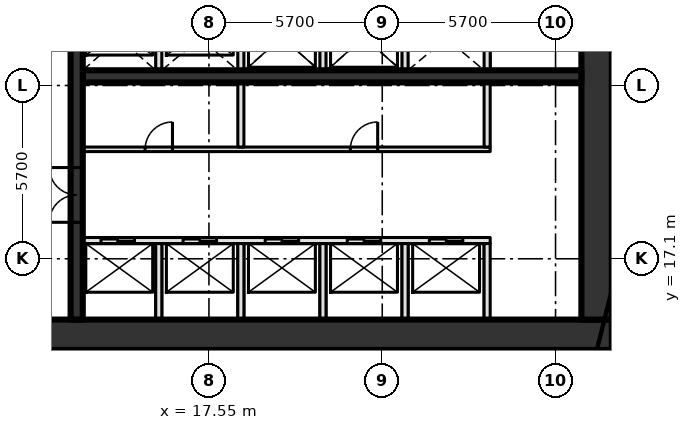
"""IFC4 building model, lengths in metres.
Left out: names, types, materials, properties, quantities, classifications, styles, units other than length and angle.
Written with IfcOpenShell. Run it as: python <this file> out.ifc"""

import sys

from ifc_helpers import new_model, si_unit, direction, frame, frame_2d, origin, place, context, subcontext, project, spatial, rectangle, extrude, element, fill, save


model = new_model("IFC4")
c1 = context("Model", 3, precision=1e-05, world=origin(), true_north=direction((0.0, 1.0)))
c2 = subcontext(c1, "Body", "Model", "MODEL_VIEW")
j1 = project(units=[si_unit("LENGTHUNIT", "METRE"), si_unit("PLANEANGLEUNIT", "RADIAN")], contexts=[c1])
p1 = place(None, origin())
s1 = spatial("IfcSite", under=j1, at=p1, CompositionType="ELEMENT")
p2 = place(p1, origin())
s2 = spatial("IfcBuilding", under=s1, at=p2, CompositionType="ELEMENT")
p3 = place(p2, frame((0.0, 0.0, 33.0)))
s3 = spatial("IfcBuildingStorey", under=s2, at=p3, CompositionType="ELEMENT", Elevation=33.0)
p4 = place(p3, frame((8.0, 14.6, -0.45), z_axis=(0.0, 0.0, 1.0), x_axis=(1.0, 0.0, 0.0)))
e1 = element("IfcWall", 1, at=p4, inside=s3, PredefinedType="SHEAR", context=c2, shape_type="SweptSolid", body=[
    extrude(rectangle(XDim=22.8, YDim=1.0, at=frame_2d((11.4, 0.0))), origin(), (0.0, 0.0, 1.0), 4.35),
])
p5 = place(p4, frame((2.3, 0.0, 0.45)))
e2 = element("IfcOpeningElement", 2, at=p5, cuts=e1, PredefinedType="OPENING", context=c2, shape_type="SweptSolid", body=[
    extrude(rectangle(XDim=1.8, YDim=2.1, at=frame_2d((0.9, 1.05))), frame((0.0, 0.51, 0.0), z_axis=(0.0, -1.0, 0.0), x_axis=(1.0, 0.0, 0.0)), (0.0, 0.0, 1.0), 1.02),
])
p6 = place(p3, frame((30.3, 15.1, -0.45), z_axis=(0.0, 0.0, 1.0), x_axis=(0.0, 1.0, 0.0)))
e3 = element("IfcWall", 3, at=p6, inside=s3, PredefinedType="SHEAR", context=c2, shape_type="SweptSolid", body=[
    extrude(rectangle(XDim=20.6, YDim=1.0, at=frame_2d((10.3, 0.0))), origin(), (0.0, 0.0, 1.0), 4.35),
])
p7 = place(p3, frame((13.4, 17.7, 0.0), z_axis=(0.0, 0.0, 1.0), x_axis=(1.0, 0.0, 0.0)))
e4 = element("IfcWall", 4, at=p7, inside=s3, PredefinedType="SOLIDWALL", context=c2, shape_type="SweptSolid", body=[
    extrude(rectangle(XDim=13.4, YDim=0.2, at=frame_2d((6.7, 0.0))), origin(), (0.0, 0.0, 1.0), 3.9),
])
p8 = place(p7, frame((0.6, 0.0, 0.0)))
e5 = element("IfcOpeningElement", 5, at=p8, cuts=e4, PredefinedType="OPENING", context=c2, shape_type="SweptSolid", body=[
    extrude(rectangle(XDim=1.1, YDim=2.1, at=frame_2d((0.55, 1.05))), frame((0.0, 0.11, 0.0), z_axis=(0.0, -1.0, 0.0), x_axis=(1.0, 0.0, 0.0)), (0.0, 0.0, 1.0), 0.22),
])
p9 = place(p7, frame((3.3, 0.0, 0.0)))
e6 = element("IfcOpeningElement", 6, at=p9, cuts=e4, PredefinedType="OPENING", context=c2, shape_type="SweptSolid", body=[
    extrude(rectangle(XDim=1.1, YDim=2.1, at=frame_2d((0.55, 1.05))), frame((0.0, 0.11, 0.0), z_axis=(0.0, -1.0, 0.0), x_axis=(1.0, 0.0, 0.0)), (0.0, 0.0, 1.0), 0.22),
])
p10 = place(p7, frame((6.0, 0.0, 0.0)))
e7 = element("IfcOpeningElement", 7, at=p10, cuts=e4, PredefinedType="OPENING", context=c2, shape_type="SweptSolid", body=[
    extrude(rectangle(XDim=1.1, YDim=2.1, at=frame_2d((0.55, 1.05))), frame((0.0, 0.11, 0.0), z_axis=(0.0, -1.0, 0.0), x_axis=(1.0, 0.0, 0.0)), (0.0, 0.0, 1.0), 0.22),
])
p11 = place(p7, frame((8.7, 0.0, 0.0)))
e8 = element("IfcOpeningElement", 8, at=p11, cuts=e4, PredefinedType="OPENING", context=c2, shape_type="SweptSolid", body=[
    extrude(rectangle(XDim=1.1, YDim=2.1, at=frame_2d((0.55, 1.05))), frame((0.0, 0.11, 0.0), z_axis=(0.0, -1.0, 0.0), x_axis=(1.0, 0.0, 0.0)), (0.0, 0.0, 1.0), 0.22),
])
p12 = place(p7, frame((11.4, 0.0, 0.0)))
e9 = element("IfcOpeningElement", 9, at=p12, cuts=e4, PredefinedType="OPENING", context=c2, shape_type="SweptSolid", body=[
    extrude(rectangle(XDim=1.1, YDim=2.1, at=frame_2d((0.55, 1.05))), frame((0.0, 0.11, 0.0), z_axis=(0.0, -1.0, 0.0), x_axis=(1.0, 0.0, 0.0)), (0.0, 0.0, 1.0), 0.22),
])
p13 = place(p3, frame((13.4, 20.7, 0.0), z_axis=(0.0, 0.0, 1.0), x_axis=(1.0, 0.0, 0.0)))
e10 = element("IfcWall", 10, at=p13, inside=s3, PredefinedType="PARTITIONING", context=c2, shape_type="SweptSolid", body=[
    extrude(rectangle(XDim=13.4, YDim=0.15, at=frame_2d((6.7, 0.0))), origin(), (0.0, 0.0, 1.0), 3.9),
])
p14 = place(p13, frame((2.05, 0.0, 0.0)))
e11 = element("IfcOpeningElement", 11, at=p14, cuts=e10, PredefinedType="OPENING", context=c2, shape_type="SweptSolid", body=[
    extrude(rectangle(XDim=0.9, YDim=2.1, at=frame_2d((0.45, 1.05))), frame((0.0, 0.085, 0.0), z_axis=(0.0, -1.0, 0.0), x_axis=(1.0, 0.0, 0.0)), (0.0, 0.0, 1.0), 0.17),
])
p15 = place(p13, frame((8.8, 0.0, 0.0)))
e12 = element("IfcOpeningElement", 12, at=p15, cuts=e10, PredefinedType="OPENING", context=c2, shape_type="SweptSolid", body=[
    extrude(rectangle(XDim=0.9, YDim=2.1, at=frame_2d((0.45, 1.05))), frame((0.0, 0.085, 0.0), z_axis=(0.0, -1.0, 0.0), x_axis=(1.0, 0.0, 0.0)), (0.0, 0.0, 1.0), 0.17),
])
p16 = place(p3, frame((13.4, 23.1, 0.0), z_axis=(0.0, 0.0, 1.0), x_axis=(1.0, 0.0, 0.0)))
e13 = element("IfcWall", 13, at=p16, inside=s3, PredefinedType="SHEAR", context=c2, shape_type="SweptSolid", body=[
    extrude(rectangle(XDim=16.4, YDim=0.4, at=frame_2d((8.2, 0.0))), origin(), (0.0, 0.0, 1.0), 3.9),
])
p17 = place(p3, frame((13.2, 15.1, 0.0), z_axis=(0.0, 0.0, 1.0), x_axis=(0.0, 1.0, 0.0)))
e14 = element("IfcWall", 14, at=p17, inside=s3, PredefinedType="SHEAR", context=c2, shape_type="SweptSolid", body=[
    extrude(rectangle(XDim=20.6, YDim=0.4, at=frame_2d((10.3, 0.0))), origin(), (0.0, 0.0, 1.0), 3.9),
])
p18 = place(p17, frame((3.2, 0.0, 0.0)))
e15 = element("IfcOpeningElement", 15, at=p18, cuts=e14, PredefinedType="OPENING", context=c2, shape_type="SweptSolid", body=[
    extrude(rectangle(XDim=1.8, YDim=2.1, at=frame_2d((0.9, 1.05))), frame((0.0, 0.21, 0.0), z_axis=(0.0, -1.0, 0.0), x_axis=(1.0, 0.0, 0.0)), (0.0, 0.0, 1.0), 0.42),
])
p19 = place(p17, frame((11.3, 0.0, 0.0)))
e16 = element("IfcOpeningElement", 16, at=p19, cuts=e14, PredefinedType="OPENING", context=c2, shape_type="SweptSolid", body=[
    extrude(rectangle(XDim=1.2, YDim=2.1, at=frame_2d((0.6, 1.05))), frame((0.0, 0.21, 0.0), z_axis=(0.0, -1.0, 0.0), x_axis=(1.0, 0.0, 0.0)), (0.0, 0.0, 1.0), 0.42),
])
p20 = place(p3, frame((15.9, 15.1, 0.0), z_axis=(0.0, 0.0, 1.0), x_axis=(0.0, 1.0, 0.0)))
e17 = element("IfcWall", 17, at=p20, inside=s3, PredefinedType="SOLIDWALL", context=c2, shape_type="SweptSolid", body=[
    extrude(rectangle(XDim=2.5, YDim=0.2, at=frame_2d((1.25, 0.0))), origin(), (0.0, 0.0, 1.0), 3.9),
])
p21 = place(p3, frame((15.9, 23.3, 0.0), z_axis=(0.0, 0.0, 1.0), x_axis=(0.0, 1.0, 0.0)))
e18 = element("IfcWall", 18, at=p21, inside=s3, PredefinedType="SOLIDWALL", context=c2, shape_type="SweptSolid", body=[
    extrude(rectangle(XDim=2.1, YDim=0.2, at=frame_2d((1.05, 0.0))), origin(), (0.0, 0.0, 1.0), 3.9),
])
p22 = place(p3, frame((18.6, 15.1, 0.0), z_axis=(0.0, 0.0, 1.0), x_axis=(0.0, 1.0, 0.0)))
e19 = element("IfcWall", 19, at=p22, inside=s3, PredefinedType="SOLIDWALL", context=c2, shape_type="SweptSolid", body=[
    extrude(rectangle(XDim=2.5, YDim=0.2, at=frame_2d((1.25, 0.0))), origin(), (0.0, 0.0, 1.0), 3.9),
])
p23 = place(p3, frame((18.6, 20.775, 0.0), z_axis=(0.0, 0.0, 1.0), x_axis=(0.0, 1.0, 0.0)))
e20 = element("IfcWall", 20, at=p23, inside=s3, PredefinedType="SOLIDWALL", context=c2, shape_type="SweptSolid", body=[
    extrude(rectangle(XDim=7.625, YDim=0.2, at=frame_2d((3.812, 0.0))), origin(), (0.0, 0.0, 1.0), 3.9),
])
p24 = place(p23, frame((5.625, 0.0, 0.0)))
e21 = element("IfcOpeningElement", 21, at=p24, cuts=e20, PredefinedType="OPENING", context=c2, shape_type="SweptSolid", body=[
    extrude(rectangle(XDim=1.2, YDim=2.1, at=frame_2d((0.6, 1.05))), frame((0.0, 0.11, 0.0), z_axis=(0.0, -1.0, 0.0), x_axis=(1.0, 0.0, 0.0)), (0.0, 0.0, 1.0), 0.22),
])
p25 = place(p3, frame((21.3, 15.1, 0.0), z_axis=(0.0, 0.0, 1.0), x_axis=(0.0, 1.0, 0.0)))
e22 = element("IfcWall", 22, at=p25, inside=s3, PredefinedType="SOLIDWALL", context=c2, shape_type="SweptSolid", body=[
    extrude(rectangle(XDim=2.5, YDim=0.2, at=frame_2d((1.25, 0.0))), origin(), (0.0, 0.0, 1.0), 3.9),
])
p26 = place(p3, frame((21.3, 23.3, 0.0), z_axis=(0.0, 0.0, 1.0), x_axis=(0.0, 1.0, 0.0)))
e23 = element("IfcWall", 23, at=p26, inside=s3, PredefinedType="SOLIDWALL", context=c2, shape_type="SweptSolid", body=[
    extrude(rectangle(XDim=2.1, YDim=0.2, at=frame_2d((1.05, 0.0))), origin(), (0.0, 0.0, 1.0), 3.9),
])
p27 = place(p3, frame((24.0, 15.1, 0.0), z_axis=(0.0, 0.0, 1.0), x_axis=(0.0, 1.0, 0.0)))
e24 = element("IfcWall", 24, at=p27, inside=s3, PredefinedType="SOLIDWALL", context=c2, shape_type="SweptSolid", body=[
    extrude(rectangle(XDim=2.5, YDim=0.2, at=frame_2d((1.25, 0.0))), origin(), (0.0, 0.0, 1.0), 3.9),
])
p28 = place(p3, frame((24.0, 23.3, 0.0), z_axis=(0.0, 0.0, 1.0), x_axis=(0.0, 1.0, 0.0)))
e25 = element("IfcWall", 25, at=p28, inside=s3, PredefinedType="SOLIDWALL", context=c2, shape_type="SweptSolid", body=[
    extrude(rectangle(XDim=2.1, YDim=0.2, at=frame_2d((1.05, 0.0))), origin(), (0.0, 0.0, 1.0), 3.9),
])
p29 = place(p3, frame((26.7, 15.1, 0.0), z_axis=(0.0, 0.0, 1.0), x_axis=(0.0, 1.0, 0.0)))
e26 = element("IfcWall", 26, at=p29, inside=s3, PredefinedType="SOLIDWALL", context=c2, shape_type="SweptSolid", body=[
    extrude(rectangle(XDim=2.5, YDim=0.2, at=frame_2d((1.25, 0.0))), origin(), (0.0, 0.0, 1.0), 3.9),
])
p30 = place(p3, frame((26.7, 20.775, 0.0), z_axis=(0.0, 0.0, 1.0), x_axis=(0.0, 1.0, 0.0)))
e27 = element("IfcWall", 27, at=p30, inside=s3, PredefinedType="SOLIDWALL", context=c2, shape_type="SweptSolid", body=[
    extrude(rectangle(XDim=4.625, YDim=0.2, at=frame_2d((2.312, 0.0))), origin(), (0.0, 0.0, 1.0), 3.9),
])
p31 = place(p3, frame((12.9, 10.078, 0.0), z_axis=(0.0, 0.0, 1.0), x_axis=(0.0, 1.0, 0.0)))
e28 = element("IfcWall", 28, at=p31, inside=s3, PredefinedType="PARTITIONING", context=c2, shape_type="SweptSolid", body=[
    extrude(rectangle(XDim=4.022, YDim=0.1, at=frame_2d((2.011, 0.0))), origin(), (0.0, 0.0, 1.0), 3.9),
])
p32 = place(p3, frame((30.8, 14.1, 0.0), z_axis=(0.0, 0.0, 1.0), x_axis=(-0.284664373847, -0.95862724469, 0.0)))
e29 = element("IfcWall", 29, at=p32, inside=s3, PredefinedType="PARTITIONING", context=c2, shape_type="SweptSolid", body=[
    extrude(rectangle(XDim=9.018, YDim=0.1, at=frame_2d((4.509, 0.0))), origin(), (0.0, 0.0, 1.0), 3.9),
])
p33 = place(p32, frame((3.88, 0.0, 0.0)))
e30 = element("IfcOpeningElement", 30, at=p33, cuts=e29, PredefinedType="OPENING", context=c2, shape_type="SweptSolid", body=[
    extrude(rectangle(XDim=1.0, YDim=2.1, at=frame_2d((0.5, 1.05))), frame((0.0, 0.06, 0.0), z_axis=(0.0, -1.0, 0.0), x_axis=(1.0, 0.0, 0.0)), (0.0, 0.0, 1.0), 0.12),
])
p34 = place(p3, frame((18.599, 7.915, 0.0), z_axis=(0.0, 0.0, 1.0), x_axis=(0.374461839275, 0.927242325892, 0.0)))
e31 = element("IfcWall", 31, at=p34, inside=s3, PredefinedType="PARTITIONING", context=c2, shape_type="SweptSolid", body=[
    extrude(rectangle(XDim=6.67, YDim=0.1, at=frame_2d((3.335, 0.0))), origin(), (0.0, 0.0, 1.0), 3.9),
])
p35 = place(p8, origin())
e32 = element("IfcDoor", 32, at=p35, inside=s3, OperationType="SLIDING_TO_LEFT", PredefinedType="DOOR", context=c2, shape_type="SweptSolid", body=[
    extrude(rectangle(XDim=1.1, YDim=2.1, at=frame_2d((0.55, 1.05))), frame((0.0, 0.025, 0.0), z_axis=(0.0, -1.0, 0.0), x_axis=(1.0, 0.0, 0.0)), (0.0, 0.0, 1.0), 0.05),
])
fill(e5, e32)
p36 = place(p9, origin())
e33 = element("IfcDoor", 33, at=p36, inside=s3, OperationType="SLIDING_TO_LEFT", PredefinedType="DOOR", context=c2, shape_type="SweptSolid", body=[
    extrude(rectangle(XDim=1.1, YDim=2.1, at=frame_2d((0.55, 1.05))), frame((0.0, 0.025, 0.0), z_axis=(0.0, -1.0, 0.0), x_axis=(1.0, 0.0, 0.0)), (0.0, 0.0, 1.0), 0.05),
])
fill(e6, e33)
p37 = place(p10, origin())
e34 = element("IfcDoor", 34, at=p37, inside=s3, OperationType="SLIDING_TO_LEFT", PredefinedType="DOOR", context=c2, shape_type="SweptSolid", body=[
    extrude(rectangle(XDim=1.1, YDim=2.1, at=frame_2d((0.55, 1.05))), frame((0.0, 0.025, 0.0), z_axis=(0.0, -1.0, 0.0), x_axis=(1.0, 0.0, 0.0)), (0.0, 0.0, 1.0), 0.05),
])
fill(e7, e34)
p38 = place(p11, origin())
e35 = element("IfcDoor", 35, at=p38, inside=s3, OperationType="SLIDING_TO_LEFT", PredefinedType="DOOR", context=c2, shape_type="SweptSolid", body=[
    extrude(rectangle(XDim=1.1, YDim=2.1, at=frame_2d((0.55, 1.05))), frame((0.0, 0.025, 0.0), z_axis=(0.0, -1.0, 0.0), x_axis=(1.0, 0.0, 0.0)), (0.0, 0.0, 1.0), 0.05),
])
fill(e8, e35)
p39 = place(p12, origin())
e36 = element("IfcDoor", 36, at=p39, inside=s3, OperationType="SLIDING_TO_LEFT", PredefinedType="DOOR", context=c2, shape_type="SweptSolid", body=[
    extrude(rectangle(XDim=1.1, YDim=2.1, at=frame_2d((0.55, 1.05))), frame((0.0, 0.025, 0.0), z_axis=(0.0, -1.0, 0.0), x_axis=(1.0, 0.0, 0.0)), (0.0, 0.0, 1.0), 0.05),
])
fill(e9, e36)
p40 = place(p14, origin())
e37 = element("IfcDoor", 37, at=p40, inside=s3, OperationType="SINGLE_SWING_RIGHT", PredefinedType="DOOR", context=c2, shape_type="SweptSolid", body=[
    extrude(rectangle(XDim=0.9, YDim=2.1, at=frame_2d((0.45, 1.05))), frame((0.0, 0.025, 0.0), z_axis=(0.0, -1.0, 0.0), x_axis=(1.0, 0.0, 0.0)), (0.0, 0.0, 1.0), 0.05),
])
fill(e11, e37)
p41 = place(p15, origin())
e38 = element("IfcDoor", 38, at=p41, inside=s3, OperationType="SINGLE_SWING_RIGHT", PredefinedType="DOOR", context=c2, shape_type="SweptSolid", body=[
    extrude(rectangle(XDim=0.9, YDim=2.1, at=frame_2d((0.45, 1.05))), frame((0.0, 0.025, 0.0), z_axis=(0.0, -1.0, 0.0), x_axis=(1.0, 0.0, 0.0)), (0.0, 0.0, 1.0), 0.05),
])
fill(e12, e38)
p42 = place(p18, origin())
e39 = element("IfcDoor", 39, at=p42, inside=s3, OperationType="DOUBLE_DOOR_SINGLE_SWING", PredefinedType="DOOR", context=c2, shape_type="SweptSolid", body=[
    extrude(rectangle(XDim=1.8, YDim=2.1, at=frame_2d((0.9, 1.05))), frame((0.0, 0.025, 0.0), z_axis=(0.0, -1.0, 0.0), x_axis=(1.0, 0.0, 0.0)), (0.0, 0.0, 1.0), 0.05),
])
fill(e15, e39)
save(model, sys.argv[1])
